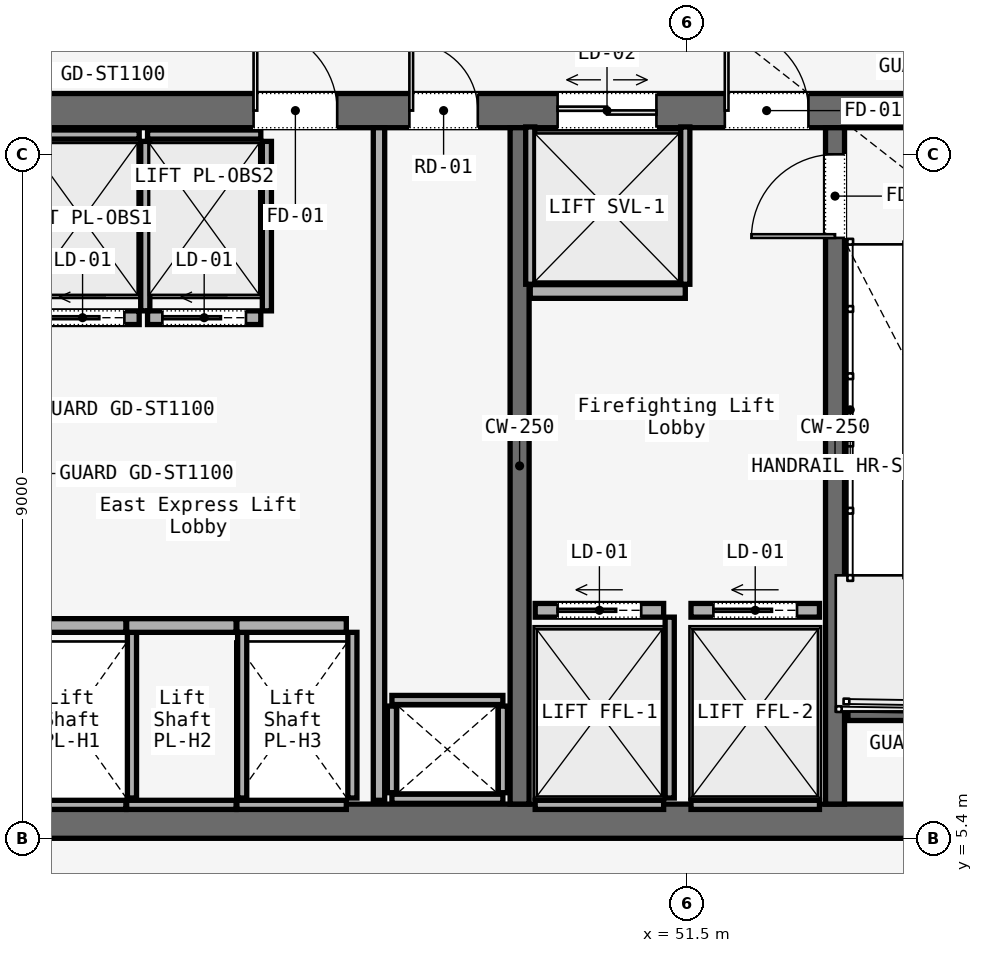
"""IFC4 building model, lengths in metres.
Left out: names, types, materials, properties, quantities, classifications, styles, units other than length and angle.
Written with IfcOpenShell. Run it as: python <this file> out.ifc"""

import sys

from ifc_helpers import new_model, si_unit, direction, frame, frame_2d, origin, place, context, subcontext, project, spatial, rectangle, extrude, element, fill, save


model = new_model("IFC4")
c1 = context("Model", 3, precision=1e-05, world=origin(), true_north=direction((0.0, 1.0)))
c2 = subcontext(c1, "Body", "Model", "MODEL_VIEW")
j1 = project(units=[si_unit("LENGTHUNIT", "METRE"), si_unit("PLANEANGLEUNIT", "RADIAN")], contexts=[c1])
p1 = place(None, origin())
s1 = spatial("IfcSite", under=j1, at=p1, CompositionType="ELEMENT")
p2 = place(p1, origin())
s2 = spatial("IfcBuilding", under=s1, at=p2, CompositionType="ELEMENT")
p3 = place(p2, frame((0.0, 0.0, 30.0)))
s3 = spatial("IfcBuildingStorey", under=s2, at=p3, CompositionType="ELEMENT", Elevation=30.0)
p4 = place(p3, frame((26.45, 14.975, 0.0), z_axis=(0.0, 0.0, 1.0), x_axis=(1.0, 0.0, 0.0)))
e1 = element("IfcWall", 1, at=p4, inside=s3, PredefinedType="SOLIDWALL", context=c2, shape_type="SweptSolid", body=[
    extrude(rectangle(XDim=31.1, YDim=0.45, at=frame_2d((15.55, 0.0))), origin(), (0.0, 0.0, 1.0), 5.78),
])
p5 = place(p4, frame((1.65, 0.0, 0.0)))
e2 = element("IfcOpeningElement", 2, at=p5, cuts=e1, PredefinedType="OPENING", context=c2, shape_type="SweptSolid", body=[
    extrude(rectangle(XDim=1.1, YDim=2.2, at=frame_2d((0.55, 1.1))), frame((0.0, 0.225, 0.0), z_axis=(0.0, -1.0, 0.0), x_axis=(1.0, 0.0, 0.0)), (0.0, 0.0, 1.0), 0.45),
])
p6 = place(p4, frame((13.65, 0.0, 0.0)))
e3 = element("IfcOpeningElement", 3, at=p6, cuts=e1, PredefinedType="OPENING", context=c2, shape_type="SweptSolid", body=[
    extrude(rectangle(XDim=1.1, YDim=2.2, at=frame_2d((0.55, 1.1))), frame((0.0, 0.225, 0.0), z_axis=(0.0, -1.0, 0.0), x_axis=(1.0, 0.0, 0.0)), (0.0, 0.0, 1.0), 0.45),
])
p7 = place(p4, frame((25.55, 0.0, 0.0)))
e4 = element("IfcOpeningElement", 4, at=p7, cuts=e1, PredefinedType="OPENING", context=c2, shape_type="SweptSolid", body=[
    extrude(rectangle(XDim=1.1, YDim=2.2, at=frame_2d((0.55, 1.1))), frame((0.0, 0.225, 0.0), z_axis=(0.0, -1.0, 0.0), x_axis=(1.0, 0.0, 0.0)), (0.0, 0.0, 1.0), 0.45),
])
p8 = place(p4, frame((10.7, 0.0, 0.0)))
e5 = element("IfcOpeningElement", 5, at=p8, cuts=e1, PredefinedType="OPENING", context=c2, shape_type="SweptSolid", body=[
    extrude(rectangle(XDim=1.4, YDim=2.2, at=frame_2d((0.7, 1.1))), frame((0.0, 0.225, 0.0), z_axis=(0.0, -1.0, 0.0), x_axis=(1.0, 0.0, 0.0)), (0.0, 0.0, 1.0), 0.45),
])
p9 = place(p4, frame((19.35, 0.0, 0.0)))
e6 = element("IfcOpeningElement", 6, at=p9, cuts=e1, PredefinedType="OPENING", context=c2, shape_type="SweptSolid", body=[
    extrude(rectangle(XDim=1.1, YDim=2.2, at=frame_2d((0.55, 1.1))), frame((0.0, 0.225, 0.0), z_axis=(0.0, -1.0, 0.0), x_axis=(1.0, 0.0, 0.0)), (0.0, 0.0, 1.0), 0.45),
])
p10 = place(p4, frame((21.4, 0.0, 0.0)))
e7 = element("IfcOpeningElement", 7, at=p10, cuts=e1, PredefinedType="OPENING", context=c2, shape_type="SweptSolid", body=[
    extrude(rectangle(XDim=0.9, YDim=2.1, at=frame_2d((0.45, 1.05))), frame((0.0, 0.225, 0.0), z_axis=(0.0, -1.0, 0.0), x_axis=(1.0, 0.0, 0.0)), (0.0, 0.0, 1.0), 0.45),
])
p11 = place(p4, frame((23.35, 0.0, 0.0)))
e8 = element("IfcOpeningElement", 8, at=p11, cuts=e1, PredefinedType="OPENING", context=c2, shape_type="SweptSolid", body=[
    extrude(rectangle(XDim=1.3, YDim=2.3, at=frame_2d((0.65, 1.15))), frame((0.0, 0.225, 0.0), z_axis=(0.0, -1.0, 0.0), x_axis=(1.0, 0.0, 0.0)), (0.0, 0.0, 1.0), 0.45),
])
p12 = place(p3, frame((26.45, 5.625, 0.0), z_axis=(0.0, 0.0, 1.0), x_axis=(1.0, 0.0, 0.0)))
e9 = element("IfcWall", 9, at=p12, inside=s3, PredefinedType="SOLIDWALL", context=c2, shape_type="SweptSolid", body=[
    extrude(rectangle(XDim=31.1, YDim=0.45, at=frame_2d((15.55, 0.0))), origin(), (0.0, 0.0, 1.0), 5.78),
])
p13 = place(p3, frame((49.3, 5.85, 0.0), z_axis=(0.0, 0.0, 1.0), x_axis=(0.0, 1.0, 0.0)))
e10 = element("IfcWall", 10, at=p13, inside=s3, PredefinedType="SOLIDWALL", context=c2, shape_type="SweptSolid", body=[
    extrude(rectangle(XDim=8.9, YDim=0.25, at=frame_2d((4.45, 0.0))), origin(), (0.0, 0.0, 1.0), 5.78),
])
p14 = place(p3, frame((53.45, 5.85, 0.0), z_axis=(0.0, 0.0, 1.0), x_axis=(0.0, 1.0, 0.0)))
e11 = element("IfcWall", 11, at=p14, inside=s3, PredefinedType="SOLIDWALL", context=c2, shape_type="SweptSolid", body=[
    extrude(rectangle(XDim=8.9, YDim=0.25, at=frame_2d((4.45, 0.0))), origin(), (0.0, 0.0, 1.0), 5.78),
])
p15 = place(p14, frame((7.45, 0.0, 0.0)))
e12 = element("IfcOpeningElement", 12, at=p15, cuts=e11, PredefinedType="OPENING", context=c2, shape_type="SweptSolid", body=[
    extrude(rectangle(XDim=1.1, YDim=2.2, at=frame_2d((0.55, 1.1))), frame((0.0, 0.125, 0.0), z_axis=(0.0, -1.0, 0.0), x_axis=(1.0, 0.0, 0.0)), (0.0, 0.0, 1.0), 0.25),
])
p16 = place(p3, frame((53.62, 7.05, 0.0), z_axis=(0.0, 0.0, 1.0), x_axis=(1.0, 0.0, 0.0)))
e13 = element("IfcWall", 13, at=p16, inside=s3, PredefinedType="SOLIDWALL", context=c2, shape_type="SweptSolid", body=[
    extrude(rectangle(XDim=3.115, YDim=0.2, at=frame_2d((1.558, 0.0))), origin(), (0.0, 0.0, 1.0), 6.0),
])
for number, where, z_axis, x_axis in (
    (14, (47.62, 5.92, 0.0), (0.0, 0.0, 1.0), (1.0, 0.0, 0.0)),
    (15, (47.62, 7.22, 0.0), (0.0, 0.0, 1.0), (1.0, 0.0, 0.0)),
):
    element("IfcWall", number, at=place(p3, frame(where, z_axis=z_axis, x_axis=x_axis)), inside=s3, PredefinedType="SOLIDWALL", context=c2, shape_type="SweptSolid", body=[
        extrude(rectangle(XDim=1.46, YDim=0.12, at=frame_2d((0.73, 0.0))), origin(), (0.0, 0.0, 1.0), 5.133),
    ])
for number, where, z_axis, x_axis in (
    (16, (47.62, 6.0, 0.0), (0.0, 0.0, 1.0), (0.0, 1.0, 0.0)),
    (17, (49.08, 6.0, 0.0), (0.0, 0.0, 1.0), (0.0, 1.0, 0.0)),
):
    element("IfcWall", number, at=place(p3, frame(where, z_axis=z_axis, x_axis=x_axis)), inside=s3, PredefinedType="SOLIDWALL", context=c2, shape_type="SweptSolid", body=[
        extrude(rectangle(XDim=1.14, YDim=0.12, at=frame_2d((0.57, 0.0))), origin(), (0.0, 0.0, 1.0), 5.133),
    ])
p17 = place(p3, frame((47.45, 5.9, 0.0), z_axis=(0.0, 0.0, 1.0), x_axis=(0.0, 1.0, 0.0)))
e18 = element("IfcWall", 18, at=p17, inside=s3, PredefinedType="PARTITIONING", context=c2, shape_type="SweptSolid", body=[
    extrude(rectangle(XDim=8.85, YDim=0.15, at=frame_2d((4.425, 0.0))), origin(), (0.0, 0.0, 1.0), 5.133),
])
p18 = place(p3, frame((42.78, 8.2, 0.0), z_axis=(0.0, 0.0, 1.0), x_axis=(1.0, 0.0, 0.0)))
e19 = element("IfcWall", 19, at=p18, inside=s3, PredefinedType="SOLIDWALL", context=c2, shape_type="SweptSolid", body=[
    extrude(rectangle(XDim=1.34, YDim=0.18, at=frame_2d((0.67, 0.0))), origin(), (0.0, 0.0, 1.0), 5.133),
])
p19 = place(p3, frame((42.78, 5.84, 0.0), z_axis=(0.0, 0.0, 1.0), x_axis=(1.0, 0.0, 0.0)))
e20 = element("IfcWall", 20, at=p19, inside=s3, PredefinedType="SOLIDWALL", context=c2, shape_type="SweptSolid", body=[
    extrude(rectangle(XDim=1.34, YDim=0.12, at=frame_2d((0.67, 0.0))), origin(), (0.0, 0.0, 1.0), 5.133),
])
p20 = place(p3, frame((44.2, 5.93, 0.0), z_axis=(0.0, 0.0, 1.0), x_axis=(0.0, 1.0, 0.0)))
e21 = element("IfcWall", 21, at=p20, inside=s3, PredefinedType="SOLIDWALL", context=c2, shape_type="SweptSolid", body=[
    extrude(rectangle(XDim=2.18, YDim=0.12, at=frame_2d((1.09, 0.0))), origin(), (0.0, 0.0, 1.0), 5.133),
])
p21 = place(p3, frame((44.13, 8.2, 0.0), z_axis=(0.0, 0.0, 1.0), x_axis=(1.0, 0.0, 0.0)))
e22 = element("IfcWall", 22, at=p21, inside=s3, PredefinedType="SOLIDWALL", context=c2, shape_type="SweptSolid", body=[
    extrude(rectangle(XDim=1.44, YDim=0.18, at=frame_2d((0.72, 0.0))), origin(), (0.0, 0.0, 1.0), 5.133),
])
p22 = place(p3, frame((44.13, 5.84, 0.0), z_axis=(0.0, 0.0, 1.0), x_axis=(1.0, 0.0, 0.0)))
e23 = element("IfcWall", 23, at=p22, inside=s3, PredefinedType="SOLIDWALL", context=c2, shape_type="SweptSolid", body=[
    extrude(rectangle(XDim=1.44, YDim=0.12, at=frame_2d((0.72, 0.0))), origin(), (0.0, 0.0, 1.0), 5.133),
])
p23 = place(p3, frame((45.65, 5.93, 0.0), z_axis=(0.0, 0.0, 1.0), x_axis=(0.0, 1.0, 0.0)))
e24 = element("IfcWall", 24, at=p23, inside=s3, PredefinedType="SOLIDWALL", context=c2, shape_type="SweptSolid", body=[
    extrude(rectangle(XDim=2.18, YDim=0.12, at=frame_2d((1.09, 0.0))), origin(), (0.0, 0.0, 1.0), 5.133),
])
p24 = place(p3, frame((45.58, 8.2, 0.0), z_axis=(0.0, 0.0, 1.0), x_axis=(1.0, 0.0, 0.0)))
e25 = element("IfcWall", 25, at=p24, inside=s3, PredefinedType="SOLIDWALL", context=c2, shape_type="SweptSolid", body=[
    extrude(rectangle(XDim=1.44, YDim=0.18, at=frame_2d((0.72, 0.0))), origin(), (0.0, 0.0, 1.0), 5.133),
])
p25 = place(p3, frame((45.58, 5.84, 0.0), z_axis=(0.0, 0.0, 1.0), x_axis=(1.0, 0.0, 0.0)))
e26 = element("IfcWall", 26, at=p25, inside=s3, PredefinedType="SOLIDWALL", context=c2, shape_type="SweptSolid", body=[
    extrude(rectangle(XDim=1.44, YDim=0.12, at=frame_2d((0.72, 0.0))), origin(), (0.0, 0.0, 1.0), 5.133),
])
p26 = place(p3, frame((47.1, 5.93, 0.0), z_axis=(0.0, 0.0, 1.0), x_axis=(0.0, 1.0, 0.0)))
e27 = element("IfcWall", 27, at=p26, inside=s3, PredefinedType="SOLIDWALL", context=c2, shape_type="SweptSolid", body=[
    extrude(rectangle(XDim=2.18, YDim=0.12, at=frame_2d((1.09, 0.0))), origin(), (0.0, 0.0, 1.0), 5.133),
])
p27 = place(p3, frame((42.805, 12.25, 0.0), z_axis=(0.0, 0.0, 1.0), x_axis=(1.0, 0.0, 0.0)))
e28 = element("IfcWall", 28, at=p27, inside=s3, PredefinedType="SOLIDWALL", context=c2, shape_type="SweptSolid", body=[
    extrude(rectangle(XDim=1.49, YDim=0.18, at=frame_2d((0.745, 0.0))), origin(), (0.0, 0.0, 1.0), 5.133),
])
p28 = place(p27, frame((0.195, 0.0, 0.0)))
e29 = element("IfcOpeningElement", 29, at=p28, cuts=e28, PredefinedType="OPENING", context=c2, shape_type="SweptSolid", body=[
    extrude(rectangle(XDim=1.1, YDim=2.2, at=frame_2d((0.55, 1.1))), frame((0.0, 0.09, 0.0), z_axis=(0.0, -1.0, 0.0), x_axis=(1.0, 0.0, 0.0)), (0.0, 0.0, 1.0), 0.18),
])
p29 = place(p3, frame((42.805, 14.66, 0.0), z_axis=(0.0, 0.0, 1.0), x_axis=(1.0, 0.0, 0.0)))
e30 = element("IfcWall", 30, at=p29, inside=s3, PredefinedType="SOLIDWALL", context=c2, shape_type="SweptSolid", body=[
    extrude(rectangle(XDim=1.49, YDim=0.12, at=frame_2d((0.745, 0.0))), origin(), (0.0, 0.0, 1.0), 5.133),
])
p30 = place(p3, frame((44.375, 12.34, 0.0), z_axis=(0.0, 0.0, 1.0), x_axis=(0.0, 1.0, 0.0)))
e31 = element("IfcWall", 31, at=p30, inside=s3, PredefinedType="SOLIDWALL", context=c2, shape_type="SweptSolid", body=[
    extrude(rectangle(XDim=2.23, YDim=0.12, at=frame_2d((1.115, 0.0))), origin(), (0.0, 0.0, 1.0), 5.133),
])
p31 = place(p3, frame((44.405, 12.25, 0.0), z_axis=(0.0, 0.0, 1.0), x_axis=(1.0, 0.0, 0.0)))
e32 = element("IfcWall", 32, at=p31, inside=s3, PredefinedType="SOLIDWALL", context=c2, shape_type="SweptSolid", body=[
    extrude(rectangle(XDim=1.49, YDim=0.18, at=frame_2d((0.745, 0.0))), origin(), (0.0, 0.0, 1.0), 5.133),
])
p32 = place(p31, frame((0.195, 0.0, 0.0)))
e33 = element("IfcOpeningElement", 33, at=p32, cuts=e32, PredefinedType="OPENING", context=c2, shape_type="SweptSolid", body=[
    extrude(rectangle(XDim=1.1, YDim=2.2, at=frame_2d((0.55, 1.1))), frame((0.0, 0.09, 0.0), z_axis=(0.0, -1.0, 0.0), x_axis=(1.0, 0.0, 0.0)), (0.0, 0.0, 1.0), 0.18),
])
p33 = place(p3, frame((44.405, 14.66, 0.0), z_axis=(0.0, 0.0, 1.0), x_axis=(1.0, 0.0, 0.0)))
e34 = element("IfcWall", 34, at=p33, inside=s3, PredefinedType="SOLIDWALL", context=c2, shape_type="SweptSolid", body=[
    extrude(rectangle(XDim=1.49, YDim=0.12, at=frame_2d((0.745, 0.0))), origin(), (0.0, 0.0, 1.0), 5.133),
])
p34 = place(p3, frame((45.975, 12.34, 0.0), z_axis=(0.0, 0.0, 1.0), x_axis=(0.0, 1.0, 0.0)))
e35 = element("IfcWall", 35, at=p34, inside=s3, PredefinedType="SOLIDWALL", context=c2, shape_type="SweptSolid", body=[
    extrude(rectangle(XDim=2.23, YDim=0.12, at=frame_2d((1.115, 0.0))), origin(), (0.0, 0.0, 1.0), 5.133),
])
p35 = place(p3, frame((49.505, 8.4, 0.0), z_axis=(0.0, 0.0, 1.0), x_axis=(1.0, 0.0, 0.0)))
e36 = element("IfcWall", 36, at=p35, inside=s3, PredefinedType="SOLIDWALL", context=c2, shape_type="SweptSolid", body=[
    extrude(rectangle(XDim=1.69, YDim=0.18, at=frame_2d((0.845, 0.0))), origin(), (0.0, 0.0, 1.0), 5.133),
])
p36 = place(p35, frame((0.295, 0.0, 0.0)))
e37 = element("IfcOpeningElement", 37, at=p36, cuts=e36, PredefinedType="OPENING", context=c2, shape_type="SweptSolid", body=[
    extrude(rectangle(XDim=1.1, YDim=2.2, at=frame_2d((0.55, 1.1))), frame((0.0, 0.09, 0.0), z_axis=(0.0, -1.0, 0.0), x_axis=(1.0, 0.0, 0.0)), (0.0, 0.0, 1.0), 0.18),
])
p37 = place(p3, frame((49.505, 5.84, 0.0), z_axis=(0.0, 0.0, 1.0), x_axis=(1.0, 0.0, 0.0)))
e38 = element("IfcWall", 38, at=p37, inside=s3, PredefinedType="SOLIDWALL", context=c2, shape_type="SweptSolid", body=[
    extrude(rectangle(XDim=1.69, YDim=0.12, at=frame_2d((0.845, 0.0))), origin(), (0.0, 0.0, 1.0), 5.133),
])
p38 = place(p3, frame((51.275, 5.93, 0.0), z_axis=(0.0, 0.0, 1.0), x_axis=(0.0, 1.0, 0.0)))
e39 = element("IfcWall", 39, at=p38, inside=s3, PredefinedType="SOLIDWALL", context=c2, shape_type="SweptSolid", body=[
    extrude(rectangle(XDim=2.38, YDim=0.12, at=frame_2d((1.19, 0.0))), origin(), (0.0, 0.0, 1.0), 5.133),
])
p39 = place(p3, frame((51.555, 8.4, 0.0), z_axis=(0.0, 0.0, 1.0), x_axis=(1.0, 0.0, 0.0)))
e40 = element("IfcWall", 40, at=p39, inside=s3, PredefinedType="SOLIDWALL", context=c2, shape_type="SweptSolid", body=[
    extrude(rectangle(XDim=1.69, YDim=0.18, at=frame_2d((0.845, 0.0))), origin(), (0.0, 0.0, 1.0), 5.133),
])
p40 = place(p39, frame((0.295, 0.0, 0.0)))
e41 = element("IfcOpeningElement", 41, at=p40, cuts=e40, PredefinedType="OPENING", context=c2, shape_type="SweptSolid", body=[
    extrude(rectangle(XDim=1.1, YDim=2.2, at=frame_2d((0.55, 1.1))), frame((0.0, 0.09, 0.0), z_axis=(0.0, -1.0, 0.0), x_axis=(1.0, 0.0, 0.0)), (0.0, 0.0, 1.0), 0.18),
])
p41 = place(p3, frame((51.555, 5.84, 0.0), z_axis=(0.0, 0.0, 1.0), x_axis=(1.0, 0.0, 0.0)))
e42 = element("IfcWall", 42, at=p41, inside=s3, PredefinedType="SOLIDWALL", context=c2, shape_type="SweptSolid", body=[
    extrude(rectangle(XDim=1.69, YDim=0.12, at=frame_2d((0.845, 0.0))), origin(), (0.0, 0.0, 1.0), 5.133),
])
p42 = place(p3, frame((49.44, 12.595, 0.0), z_axis=(0.0, 0.0, 1.0), x_axis=(1.0, 0.0, 0.0)))
e43 = element("IfcWall", 43, at=p42, inside=s3, PredefinedType="SOLIDWALL", context=c2, shape_type="SweptSolid", body=[
    extrude(rectangle(XDim=2.04, YDim=0.18, at=frame_2d((1.02, 0.0))), origin(), (0.0, 0.0, 1.0), 5.133),
])
for number, where, z_axis, x_axis in (
    (44, (49.44, 12.69, 0.0), (0.0, 0.0, 1.0), (0.0, 1.0, 0.0)),
    (45, (51.48, 12.69, 0.0), (0.0, 0.0, 1.0), (0.0, 1.0, 0.0)),
):
    element("IfcWall", number, at=place(p3, frame(where, z_axis=z_axis, x_axis=x_axis)), inside=s3, PredefinedType="SOLIDWALL", context=c2, shape_type="SweptSolid", body=[
        extrude(rectangle(XDim=2.07, YDim=0.12, at=frame_2d((1.035, 0.0))), origin(), (0.0, 0.0, 1.0), 5.133),
    ])
p43 = place(p7, origin())
e46 = element("IfcDoor", 46, at=p43, inside=s3, OperationType="SINGLE_SWING_RIGHT", PredefinedType="DOOR", context=c2, shape_type="SweptSolid", body=[
    extrude(rectangle(XDim=1.1, YDim=2.2, at=frame_2d((0.55, 1.1))), frame((0.0, 0.025, 0.0), z_axis=(0.0, -1.0, 0.0), x_axis=(1.0, 0.0, 0.0)), (0.0, 0.0, 1.0), 0.05),
])
fill(e4, e46)
p44 = place(p9, origin())
e47 = element("IfcDoor", 47, at=p44, inside=s3, OperationType="SINGLE_SWING_LEFT", PredefinedType="DOOR", context=c2, shape_type="SweptSolid", body=[
    extrude(rectangle(XDim=1.1, YDim=2.2, at=frame_2d((0.55, 1.1))), frame((0.0, 0.025, 0.0), z_axis=(0.0, -1.0, 0.0), x_axis=(1.0, 0.0, 0.0)), (0.0, 0.0, 1.0), 0.05),
])
fill(e6, e47)
p45 = place(p10, origin())
e48 = element("IfcDoor", 48, at=p45, inside=s3, OperationType="SINGLE_SWING_LEFT", PredefinedType="DOOR", context=c2, shape_type="SweptSolid", body=[
    extrude(rectangle(XDim=0.9, YDim=2.1, at=frame_2d((0.45, 1.05))), frame((0.0, 0.025, 0.0), z_axis=(0.0, -1.0, 0.0), x_axis=(1.0, 0.0, 0.0)), (0.0, 0.0, 1.0), 0.05),
])
fill(e7, e48)
p46 = place(p15, origin())
e49 = element("IfcDoor", 49, at=p46, inside=s3, OperationType="SINGLE_SWING_LEFT", PredefinedType="DOOR", context=c2, shape_type="SweptSolid", body=[
    extrude(rectangle(XDim=1.1, YDim=2.2, at=frame_2d((0.55, 1.1))), frame((0.0, 0.025, 0.0), z_axis=(0.0, -1.0, 0.0), x_axis=(1.0, 0.0, 0.0)), (0.0, 0.0, 1.0), 0.05),
])
fill(e12, e49)
p47 = place(p28, origin())
e50 = element("IfcDoor", 50, at=p47, inside=s3, OperationType="SLIDING_TO_LEFT", PredefinedType="DOOR", context=c2, shape_type="SweptSolid", body=[
    extrude(rectangle(XDim=1.1, YDim=2.2, at=frame_2d((0.55, 1.1))), frame((0.0, 0.025, 0.0), z_axis=(0.0, -1.0, 0.0), x_axis=(1.0, 0.0, 0.0)), (0.0, 0.0, 1.0), 0.05),
])
fill(e29, e50)
p48 = place(p32, origin())
e51 = element("IfcDoor", 51, at=p48, inside=s3, OperationType="SLIDING_TO_LEFT", PredefinedType="DOOR", context=c2, shape_type="SweptSolid", body=[
    extrude(rectangle(XDim=1.1, YDim=2.2, at=frame_2d((0.55, 1.1))), frame((0.0, 0.025, 0.0), z_axis=(0.0, -1.0, 0.0), x_axis=(1.0, 0.0, 0.0)), (0.0, 0.0, 1.0), 0.05),
])
fill(e33, e51)
p49 = place(p36, origin())
e52 = element("IfcDoor", 52, at=p49, inside=s3, OperationType="SLIDING_TO_LEFT", PredefinedType="DOOR", context=c2, shape_type="SweptSolid", body=[
    extrude(rectangle(XDim=1.1, YDim=2.2, at=frame_2d((0.55, 1.1))), frame((0.0, 0.025, 0.0), z_axis=(0.0, -1.0, 0.0), x_axis=(1.0, 0.0, 0.0)), (0.0, 0.0, 1.0), 0.05),
])
fill(e37, e52)
p50 = place(p40, origin())
e53 = element("IfcDoor", 53, at=p50, inside=s3, OperationType="SLIDING_TO_LEFT", PredefinedType="DOOR", context=c2, shape_type="SweptSolid", body=[
    extrude(rectangle(XDim=1.1, YDim=2.2, at=frame_2d((0.55, 1.1))), frame((0.0, 0.025, 0.0), z_axis=(0.0, -1.0, 0.0), x_axis=(1.0, 0.0, 0.0)), (0.0, 0.0, 1.0), 0.05),
])
fill(e41, e53)
p51 = place(p11, origin())
e54 = element("IfcDoor", 54, at=p51, inside=s3, OperationType="DOUBLE_DOOR_SLIDING", PredefinedType="DOOR", context=c2, shape_type="SweptSolid", body=[
    extrude(rectangle(XDim=1.3, YDim=2.3, at=frame_2d((0.65, 1.15))), frame((0.0, 0.025, 0.0), z_axis=(0.0, -1.0, 0.0), x_axis=(1.0, 0.0, 0.0)), (0.0, 0.0, 1.0), 0.05),
])
fill(e8, e54)
save(model, sys.argv[1])
